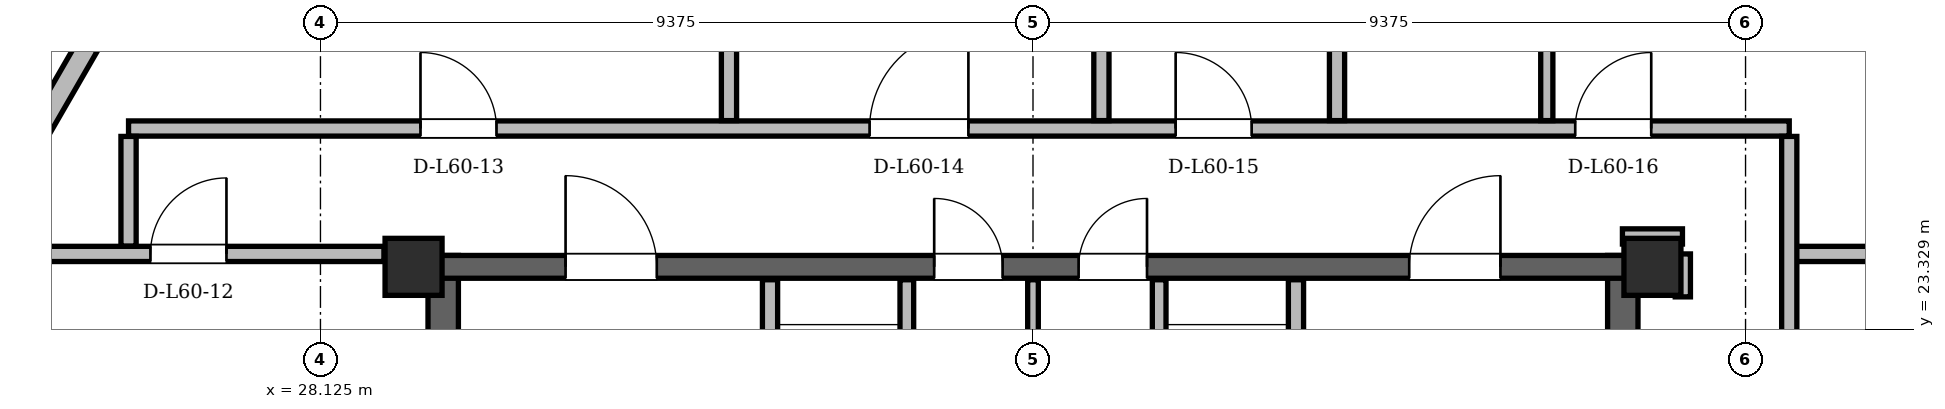
"""IFC4 building model, lengths in metres.
Left out: names, types, materials, properties, quantities, classifications, styles, units other than length and angle.
Written with IfcOpenShell. Run it as: python <this file> out.ifc"""

import sys

from ifc_helpers import new_model, si_unit, direction, frame, frame_2d, origin, origin_2d, place, context, subcontext, project, spatial, rectangle, hollow_rectangle, extrude, element, fill, save


model = new_model("IFC4")
c1 = context("Model", 3, precision=1e-05, world=origin(), true_north=direction((0.0, 1.0)))
c2 = subcontext(c1, "Body", "Model", "MODEL_VIEW")
j1 = project(units=[si_unit("LENGTHUNIT", "METRE"), si_unit("PLANEANGLEUNIT", "RADIAN")], contexts=[c1])
p1 = place(None, origin())
s1 = spatial("IfcSite", under=j1, at=p1, CompositionType="ELEMENT")
p2 = place(p1, origin())
s2 = spatial("IfcBuilding", under=s1, at=p2, CompositionType="ELEMENT")
p3 = place(p2, frame((0.0, 0.0, 227.1)))
s3 = spatial("IfcBuildingStorey", under=s2, at=p3, CompositionType="ELEMENT", Elevation=227.1)
for number, where, z_axis, x_axis in (
    (1, (45.65, 24.15, 0.0), (0.0, 0.0, 1.0), (1.0, 0.0, 0.0)),
    (2, (29.35, 24.15, 0.0), (0.0, 0.0, 1.0), (1.0, 0.0, 0.0)),
):
    element("IfcColumn", number, at=place(p3, frame(where, z_axis=z_axis, x_axis=x_axis)), inside=s3, PredefinedType="COLUMN", context=c2, shape_type="SweptSolid", body=[
        extrude(hollow_rectangle(XDim=0.75, YDim=0.75, WallThickness=0.06, at=origin_2d()), origin(), (0.0, 0.0, 1.0), 3.6),
    ])
for number, where, z_axis, x_axis in (
    (3, (29.74, 11.0, 0.0), (0.0, 0.0, 1.0), (0.0, 1.0, 0.0)),
    (4, (45.26, 11.0, 0.0), (0.0, 0.0, 1.0), (0.0, 1.0, 0.0)),
):
    element("IfcWall", number, at=place(p3, frame(where, z_axis=z_axis, x_axis=x_axis)), inside=s3, PredefinedType="SHEAR", context=c2, shape_type="SweptSolid", body=[
        extrude(rectangle(XDim=13.3, YDim=0.4, at=frame_2d((6.65, 0.0))), origin(), (0.0, 0.0, 1.0), 3.38),
    ])
p4 = place(p3, frame((29.65, 24.15, 0.0), z_axis=(0.0, 0.0, 1.0), x_axis=(1.0, 0.0, 0.0)))
e5 = element("IfcWall", 5, at=p4, inside=s3, PredefinedType="SHEAR", context=c2, shape_type="SweptSolid", body=[
    extrude(rectangle(XDim=15.7, YDim=0.3, at=frame_2d((7.85, 0.0))), origin(), (0.0, 0.0, 1.0), 3.38),
])
p5 = place(p4, frame((1.7, 0.0, 0.0)))
e6 = element("IfcOpeningElement", 6, at=p5, cuts=e5, PredefinedType="OPENING", context=c2, shape_type="SweptSolid", body=[
    extrude(rectangle(XDim=1.2, YDim=2.2, at=frame_2d((0.6, 1.1))), frame((0.0, 0.15, 0.0), z_axis=(0.0, -1.0, 0.0), x_axis=(1.0, 0.0, 0.0)), (0.0, 0.0, 1.0), 0.3),
])
p6 = place(p4, frame((12.8, 0.0, 0.0)))
e7 = element("IfcOpeningElement", 7, at=p6, cuts=e5, PredefinedType="OPENING", context=c2, shape_type="SweptSolid", body=[
    extrude(rectangle(XDim=1.2, YDim=2.2, at=frame_2d((0.6, 1.1))), frame((0.0, 0.15, 0.0), z_axis=(0.0, -1.0, 0.0), x_axis=(1.0, 0.0, 0.0)), (0.0, 0.0, 1.0), 0.3),
])
p7 = place(p4, frame((6.55, 0.0, 0.0)))
e8 = element("IfcOpeningElement", 8, at=p7, cuts=e5, PredefinedType="OPENING", context=c2, shape_type="SweptSolid", body=[
    extrude(rectangle(XDim=0.9, YDim=2.05, at=frame_2d((0.45, 1.025))), frame((0.0, 0.15, 0.0), z_axis=(0.0, -1.0, 0.0), x_axis=(1.0, 0.0, 0.0)), (0.0, 0.0, 1.0), 0.3),
])
p8 = place(p4, frame((8.45, 0.0, 0.0)))
e9 = element("IfcOpeningElement", 9, at=p8, cuts=e5, PredefinedType="OPENING", context=c2, shape_type="SweptSolid", body=[
    extrude(rectangle(XDim=0.9, YDim=2.05, at=frame_2d((0.45, 1.025))), frame((0.0, 0.15, 0.0), z_axis=(0.0, -1.0, 0.0), x_axis=(1.0, 0.0, 0.0)), (0.0, 0.0, 1.0), 0.3),
])
p9 = place(p3, frame((34.344, 43.135, 0.0), z_axis=(0.0, 0.0, 1.0), x_axis=(-0.499998927115, -0.866026023214, 0.0)))
e10 = element("IfcWall", 10, at=p9, inside=s3, PredefinedType="SOLIDWALL", context=c2, shape_type="SweptSolid", body=[
    extrude(rectangle(XDim=36.742, YDim=0.29, at=frame_2d((18.371, 0.0))), origin(), (0.0, 0.0, 1.0), 2.677),
])
p10 = place(p9, frame((8.664, 0.0, 0.0)))
e11 = element("IfcOpeningElement", 11, at=p10, cuts=e10, PredefinedType="OPENING", context=c2, shape_type="SweptSolid", body=[
    extrude(rectangle(XDim=1.5, YDim=2.2, at=frame_2d((0.75, 1.1))), frame((0.0, 0.145, 0.0), z_axis=(0.0, -1.0, 0.0), x_axis=(1.0, 0.0, 0.0)), (0.0, 0.0, 1.0), 0.29),
])
p11 = place(p9, frame((28.452, 0.0, 0.0)))
e12 = element("IfcOpeningElement", 12, at=p11, cuts=e10, PredefinedType="OPENING", context=c2, shape_type="SweptSolid", body=[
    extrude(rectangle(XDim=1.5, YDim=2.2, at=frame_2d((0.75, 1.1))), frame((0.0, 0.145, 0.0), z_axis=(0.0, -1.0, 0.0), x_axis=(1.0, 0.0, 0.0)), (0.0, 0.0, 1.0), 0.29),
])
p12 = place(p9, frame((22.282, 0.0, 0.85)))
e13 = element("IfcOpeningElement", 13, at=p12, cuts=e10, PredefinedType="OPENING", context=c2, shape_type="SweptSolid", body=[
    extrude(rectangle(XDim=2.4, YDim=1.717, at=frame_2d((1.2, 0.858))), frame((0.0, 0.145, 0.0), z_axis=(0.0, -1.0, 0.0), x_axis=(1.0, 0.0, 0.0)), (0.0, 0.0, 1.0), 0.29),
])
p13 = place(p9, frame((33.369, 0.0, 0.85)))
e14 = element("IfcOpeningElement", 14, at=p13, cuts=e10, PredefinedType="OPENING", context=c2, shape_type="SweptSolid", body=[
    extrude(rectangle(XDim=2.2, YDim=1.717, at=frame_2d((1.1, 0.858))), frame((0.0, 0.145, 0.0), z_axis=(0.0, -1.0, 0.0), x_axis=(1.0, 0.0, 0.0)), (0.0, 0.0, 1.0), 0.29),
])
p14 = place(p9, frame((11.999, 0.0, 0.85)))
e15 = element("IfcOpeningElement", 15, at=p14, cuts=e10, PredefinedType="OPENING", context=c2, shape_type="SweptSolid", body=[
    extrude(rectangle(XDim=2.4, YDim=1.717, at=frame_2d((1.2, 0.858))), frame((0.0, 0.145, 0.0), z_axis=(0.0, -1.0, 0.0), x_axis=(1.0, 0.0, 0.0)), (0.0, 0.0, 1.0), 0.29),
])
p15 = place(p9, frame((16.783, 0.0, 0.85)))
e16 = element("IfcOpeningElement", 16, at=p15, cuts=e10, PredefinedType="OPENING", context=c2, shape_type="SweptSolid", body=[
    extrude(rectangle(XDim=1.8, YDim=1.717, at=frame_2d((0.9, 0.858))), frame((0.0, 0.145, 0.0), z_axis=(0.0, -1.0, 0.0), x_axis=(1.0, 0.0, 0.0)), (0.0, 0.0, 1.0), 0.29),
])
p16 = place(p9, frame((3.365, 0.0, 0.85)))
e17 = element("IfcOpeningElement", 17, at=p16, cuts=e10, PredefinedType="OPENING", context=c2, shape_type="SweptSolid", body=[
    extrude(rectangle(XDim=1.2, YDim=1.48, at=frame_2d((0.6, 0.74))), frame((0.0, 0.145, 0.0), z_axis=(0.0, -1.0, 0.0), x_axis=(1.0, 0.0, 0.0)), (0.0, 0.0, 1.0), 0.29),
])
p17 = place(p9, frame((6.797, 0.0, 0.85)))
e18 = element("IfcOpeningElement", 18, at=p17, cuts=e10, PredefinedType="OPENING", context=c2, shape_type="SweptSolid", body=[
    extrude(rectangle(XDim=1.2, YDim=1.48, at=frame_2d((0.6, 0.74))), frame((0.0, 0.145, 0.0), z_axis=(0.0, -1.0, 0.0), x_axis=(1.0, 0.0, 0.0)), (0.0, 0.0, 1.0), 0.29),
])
p18 = place(p3, frame((34.04, 19.48, 0.0), z_axis=(0.0, 0.0, 1.0), x_axis=(0.0, 1.0, 0.0)))
e19 = element("IfcWall", 19, at=p18, inside=s3, PredefinedType="PARTITIONING", context=c2, shape_type="SweptSolid", body=[
    extrude(rectangle(XDim=4.5, YDim=0.2, at=frame_2d((2.25, 0.0))), origin(), (0.0, 0.0, 1.0), 3.38),
])
p19 = place(p18, frame((2.12, 0.0, 0.0)))
e20 = element("IfcOpeningElement", 20, at=p19, cuts=e19, PredefinedType="OPENING", context=c2, shape_type="SweptSolid", body=[
    extrude(rectangle(XDim=1.1, YDim=2.2, at=frame_2d((0.55, 1.1))), frame((0.0, 0.1, 0.0), z_axis=(0.0, -1.0, 0.0), x_axis=(1.0, 0.0, 0.0)), (0.0, 0.0, 1.0), 0.2),
])
p20 = place(p3, frame((35.84, 20.96, 0.0), z_axis=(0.0, 0.0, 1.0), x_axis=(0.0, 1.0, 0.0)))
e21 = element("IfcWall", 21, at=p20, inside=s3, PredefinedType="PARTITIONING", context=c2, shape_type="SweptSolid", body=[
    extrude(rectangle(XDim=3.02, YDim=0.18, at=frame_2d((1.51, 0.0))), origin(), (0.0, 0.0, 1.0), 3.38),
])
p21 = place(p3, frame((40.96, 19.48, 0.0), z_axis=(0.0, 0.0, 1.0), x_axis=(0.0, 1.0, 0.0)))
e22 = element("IfcWall", 22, at=p21, inside=s3, PredefinedType="PARTITIONING", context=c2, shape_type="SweptSolid", body=[
    extrude(rectangle(XDim=4.5, YDim=0.2, at=frame_2d((2.25, 0.0))), origin(), (0.0, 0.0, 1.0), 3.38),
])
p22 = place(p21, frame((2.12, 0.0, 0.0)))
e23 = element("IfcOpeningElement", 23, at=p22, cuts=e22, PredefinedType="OPENING", context=c2, shape_type="SweptSolid", body=[
    extrude(rectangle(XDim=1.1, YDim=2.2, at=frame_2d((0.55, 1.1))), frame((0.0, 0.1, 0.0), z_axis=(0.0, -1.0, 0.0), x_axis=(1.0, 0.0, 0.0)), (0.0, 0.0, 1.0), 0.2),
])
p23 = place(p3, frame((39.16, 20.96, 0.0), z_axis=(0.0, 0.0, 1.0), x_axis=(0.0, 1.0, 0.0)))
e24 = element("IfcWall", 24, at=p23, inside=s3, PredefinedType="PARTITIONING", context=c2, shape_type="SweptSolid", body=[
    extrude(rectangle(XDim=3.02, YDim=0.18, at=frame_2d((1.51, 0.0))), origin(), (0.0, 0.0, 1.0), 3.38),
])
p24 = place(p3, frame((37.5, 21.06, 0.0), z_axis=(0.0, 0.0, 1.0), x_axis=(0.0, 1.0, 0.0)))
e25 = element("IfcWall", 25, at=p24, inside=s3, PredefinedType="PARTITIONING", context=c2, shape_type="SweptSolid", body=[
    extrude(rectangle(XDim=2.92, YDim=0.14, at=frame_2d((1.46, 0.0))), origin(), (0.0, 0.0, 1.0), 3.38),
])
p25 = place(p3, frame((23.653, 24.32, 0.0), z_axis=(0.0, 0.0, 1.0), x_axis=(1.0, 0.0, 0.0)))
e26 = element("IfcWall", 26, at=p25, inside=s3, PredefinedType="PARTITIONING", context=c2, shape_type="SweptSolid", body=[
    extrude(rectangle(XDim=5.307, YDim=0.2, at=frame_2d((2.653, 0.0))), origin(), (0.0, 0.0, 1.0), 3.38),
])
p26 = place(p25, frame((2.235, 0.0, 0.0)))
e27 = element("IfcOpeningElement", 27, at=p26, cuts=e26, PredefinedType="OPENING", context=c2, shape_type="SweptSolid", body=[
    extrude(rectangle(XDim=1.0, YDim=2.18, at=frame_2d((0.5, 1.09))), frame((0.0, 0.1, 0.0), z_axis=(0.0, -1.0, 0.0), x_axis=(1.0, 0.0, 0.0)), (0.0, 0.0, 1.0), 0.2),
])
p27 = place(p3, frame((47.45, 24.32, 0.0), z_axis=(0.0, 0.0, 1.0), x_axis=(1.0, 0.0, 0.0)))
e28 = element("IfcWall", 28, at=p27, inside=s3, PredefinedType="PARTITIONING", context=c2, shape_type="SweptSolid", body=[
    extrude(rectangle(XDim=3.897, YDim=0.2, at=frame_2d((1.948, 0.0))), origin(), (0.0, 0.0, 1.0), 3.38),
])
p28 = place(p3, frame((45.255, 24.55, 0.0), z_axis=(0.0, 0.0, 1.0), x_axis=(1.0, 0.0, 0.0)))
e29 = element("IfcWall", 29, at=p28, inside=s3, PredefinedType="PARTITIONING", context=c2, shape_type="SweptSolid", body=[
    extrude(rectangle(XDim=0.79, YDim=0.2, at=frame_2d((0.395, 0.0))), origin(), (0.0, 0.0, 1.0), 2.913),
])
p29 = place(p3, frame((25.6, 25.97, 0.0), z_axis=(0.0, 0.0, 1.0), x_axis=(1.0, 0.0, 0.0)))
e30 = element("IfcWall", 30, at=p29, inside=s3, PredefinedType="PARTITIONING", context=c2, shape_type="SweptSolid", body=[
    extrude(rectangle(XDim=21.85, YDim=0.2, at=frame_2d((10.925, 0.0))), origin(), (0.0, 0.0, 1.0), 2.913),
])
p30 = place(p29, frame((3.841, 0.0, 0.0)))
e31 = element("IfcOpeningElement", 31, at=p30, cuts=e30, PredefinedType="OPENING", context=c2, shape_type="SweptSolid", body=[
    extrude(rectangle(XDim=1.0, YDim=2.18, at=frame_2d((0.5, 1.09))), frame((0.0, 0.1, 0.0), z_axis=(0.0, -1.0, 0.0), x_axis=(1.0, 0.0, 0.0)), (0.0, 0.0, 1.0), 0.2),
])
p31 = place(p29, frame((9.75, 0.0, 0.0)))
e32 = element("IfcOpeningElement", 32, at=p31, cuts=e30, PredefinedType="OPENING", context=c2, shape_type="SweptSolid", body=[
    extrude(rectangle(XDim=1.3, YDim=2.2, at=frame_2d((0.65, 1.1))), frame((0.0, 0.1, 0.0), z_axis=(0.0, -1.0, 0.0), x_axis=(1.0, 0.0, 0.0)), (0.0, 0.0, 1.0), 0.2),
])
p32 = place(p29, frame((13.777, 0.0, 0.0)))
e33 = element("IfcOpeningElement", 33, at=p32, cuts=e30, PredefinedType="OPENING", context=c2, shape_type="SweptSolid", body=[
    extrude(rectangle(XDim=1.0, YDim=2.18, at=frame_2d((0.5, 1.09))), frame((0.0, 0.1, 0.0), z_axis=(0.0, -1.0, 0.0), x_axis=(1.0, 0.0, 0.0)), (0.0, 0.0, 1.0), 0.2),
])
p33 = place(p29, frame((19.034, 0.0, 0.0)))
e34 = element("IfcOpeningElement", 34, at=p33, cuts=e30, PredefinedType="OPENING", context=c2, shape_type="SweptSolid", body=[
    extrude(rectangle(XDim=1.0, YDim=2.18, at=frame_2d((0.5, 1.09))), frame((0.0, 0.1, 0.0), z_axis=(0.0, -1.0, 0.0), x_axis=(1.0, 0.0, 0.0)), (0.0, 0.0, 1.0), 0.2),
])
p34 = place(p3, frame((25.6, 24.424, 0.0), z_axis=(0.0, 0.0, 1.0), x_axis=(0.0, 1.0, 0.0)))
e35 = element("IfcWall", 35, at=p34, inside=s3, PredefinedType="PARTITIONING", context=c2, shape_type="SweptSolid", body=[
    extrude(rectangle(XDim=1.442, YDim=0.2, at=frame_2d((0.721, 0.0))), origin(), (0.0, 0.0, 1.0), 3.38),
])
p35 = place(p3, frame((33.5, 26.074, 0.0), z_axis=(0.0, 0.0, 1.0), x_axis=(0.0, 1.0, 0.0)))
e36 = element("IfcWall", 36, at=p35, inside=s3, PredefinedType="PARTITIONING", context=c2, shape_type="SweptSolid", body=[
    extrude(rectangle(XDim=15.301, YDim=0.2, at=frame_2d((7.651, 0.0))), origin(), (0.0, 0.0, 1.0), 2.913),
])
p36 = place(p3, frame((38.4, 26.074, 0.0), z_axis=(0.0, 0.0, 1.0), x_axis=(0.0, 1.0, 0.0)))
e37 = element("IfcWall", 37, at=p36, inside=s3, PredefinedType="PARTITIONING", context=c2, shape_type="SweptSolid", body=[
    extrude(rectangle(XDim=4.292, YDim=0.2, at=frame_2d((2.146, 0.0))), origin(), (0.0, 0.0, 1.0), 3.38),
])
p37 = place(p3, frame((41.5, 26.074, 0.0), z_axis=(0.0, 0.0, 1.0), x_axis=(0.0, 1.0, 0.0)))
e38 = element("IfcWall", 38, at=p37, inside=s3, PredefinedType="PARTITIONING", context=c2, shape_type="SweptSolid", body=[
    extrude(rectangle(XDim=15.301, YDim=0.2, at=frame_2d((7.651, 0.0))), origin(), (0.0, 0.0, 1.0), 2.913),
])
p38 = place(p3, frame((44.26, 26.074, 0.0), z_axis=(0.0, 0.0, 1.0), x_axis=(0.0, 1.0, 0.0)))
e39 = element("IfcWall", 39, at=p38, inside=s3, PredefinedType="PARTITIONING", context=c2, shape_type="SweptSolid", body=[
    extrude(rectangle(XDim=10.521, YDim=0.16, at=frame_2d((5.26, 0.0))), origin(), (0.0, 0.0, 1.0), 2.913),
])
p39 = place(p38, frame((2.548, 0.0, 0.0)))
e40 = element("IfcOpeningElement", 40, at=p39, cuts=e39, PredefinedType="OPENING", context=c2, shape_type="SweptSolid", body=[
    extrude(rectangle(XDim=0.92, YDim=2.12, at=frame_2d((0.46, 1.06))), frame((0.0, 0.08, 0.0), z_axis=(0.0, -1.0, 0.0), x_axis=(1.0, 0.0, 0.0)), (0.0, 0.0, 1.0), 0.16),
])
p40 = place(p38, frame((6.917, 0.0, 0.0)))
e41 = element("IfcOpeningElement", 41, at=p40, cuts=e39, PredefinedType="OPENING", context=c2, shape_type="SweptSolid", body=[
    extrude(rectangle(XDim=0.95, YDim=2.1, at=frame_2d((0.475, 1.05))), frame((0.0, 0.08, 0.0), z_axis=(0.0, -1.0, 0.0), x_axis=(1.0, 0.0, 0.0)), (0.0, 0.0, 1.0), 0.16),
])
p41 = place(p38, frame((9.154, 0.0, 0.0)))
e42 = element("IfcOpeningElement", 42, at=p41, cuts=e39, PredefinedType="OPENING", context=c2, shape_type="SweptSolid", body=[
    extrude(rectangle(XDim=0.88, YDim=2.08, at=frame_2d((0.44, 1.04))), frame((0.0, 0.08, 0.0), z_axis=(0.0, -1.0, 0.0), x_axis=(1.0, 0.0, 0.0)), (0.0, 0.0, 1.0), 0.16),
])
p42 = place(p3, frame((46.05, 23.755, 0.0), z_axis=(0.0, 0.0, 1.0), x_axis=(0.0, 1.0, 0.0)))
e43 = element("IfcWall", 43, at=p42, inside=s3, PredefinedType="PARTITIONING", context=c2, shape_type="SweptSolid", body=[
    extrude(rectangle(XDim=0.565, YDim=0.2, at=frame_2d((0.283, 0.0))), origin(), (0.0, 0.0, 1.0), 3.38),
])
p43 = place(p3, frame((47.45, 9.404, 0.0), z_axis=(0.0, 0.0, 1.0), x_axis=(0.0, 1.0, 0.0)))
e44 = element("IfcWall", 44, at=p43, inside=s3, PredefinedType="PARTITIONING", context=c2, shape_type="SweptSolid", body=[
    extrude(rectangle(XDim=16.462, YDim=0.2, at=frame_2d((8.231, 0.0))), origin(), (0.0, 0.0, 1.0), 2.913),
])
p44 = place(p43, frame((3.163, 0.0, 0.0)))
e45 = element("IfcOpeningElement", 45, at=p44, cuts=e44, PredefinedType="OPENING", context=c2, shape_type="SweptSolid", body=[
    extrude(rectangle(XDim=1.0, YDim=2.18, at=frame_2d((0.5, 1.09))), frame((0.0, 0.1, 0.0), z_axis=(0.0, -1.0, 0.0), x_axis=(1.0, 0.0, 0.0)), (0.0, 0.0, 1.0), 0.2),
])
p45 = place(p43, frame((9.778, 0.0, 0.0)))
e46 = element("IfcOpeningElement", 46, at=p45, cuts=e44, PredefinedType="OPENING", context=c2, shape_type="SweptSolid", body=[
    extrude(rectangle(XDim=1.0, YDim=2.18, at=frame_2d((0.5, 1.09))), frame((0.0, 0.1, 0.0), z_axis=(0.0, -1.0, 0.0), x_axis=(1.0, 0.0, 0.0)), (0.0, 0.0, 1.0), 0.2),
])
p46 = place(p5, origin())
e47 = element("IfcDoor", 47, at=p46, inside=s3, OperationType="SINGLE_SWING_LEFT", PredefinedType="DOOR", context=c2, shape_type="SweptSolid", body=[
    extrude(rectangle(XDim=1.2, YDim=2.2, at=frame_2d((0.6, 1.1))), frame((0.0, 0.025, 0.0), z_axis=(0.0, -1.0, 0.0), x_axis=(1.0, 0.0, 0.0)), (0.0, 0.0, 1.0), 0.05),
])
fill(e6, e47)
p47 = place(p6, origin())
e48 = element("IfcDoor", 48, at=p47, inside=s3, OperationType="SINGLE_SWING_RIGHT", PredefinedType="DOOR", context=c2, shape_type="SweptSolid", body=[
    extrude(rectangle(XDim=1.2, YDim=2.2, at=frame_2d((0.6, 1.1))), frame((0.0, 0.025, 0.0), z_axis=(0.0, -1.0, 0.0), x_axis=(1.0, 0.0, 0.0)), (0.0, 0.0, 1.0), 0.05),
])
fill(e7, e48)
p48 = place(p7, origin())
e49 = element("IfcDoor", 49, at=p48, inside=s3, OperationType="SINGLE_SWING_LEFT", PredefinedType="DOOR", context=c2, shape_type="SweptSolid", body=[
    extrude(rectangle(XDim=0.9, YDim=2.05, at=frame_2d((0.45, 1.025))), frame((0.0, 0.025, 0.0), z_axis=(0.0, -1.0, 0.0), x_axis=(1.0, 0.0, 0.0)), (0.0, 0.0, 1.0), 0.05),
])
fill(e8, e49)
p49 = place(p8, origin())
e50 = element("IfcDoor", 50, at=p49, inside=s3, OperationType="SINGLE_SWING_RIGHT", PredefinedType="DOOR", context=c2, shape_type="SweptSolid", body=[
    extrude(rectangle(XDim=0.9, YDim=2.05, at=frame_2d((0.45, 1.025))), frame((0.0, 0.025, 0.0), z_axis=(0.0, -1.0, 0.0), x_axis=(1.0, 0.0, 0.0)), (0.0, 0.0, 1.0), 0.05),
])
fill(e9, e50)
p50 = place(p26, origin())
e51 = element("IfcDoor", 51, at=p50, inside=s3, OperationType="SINGLE_SWING_RIGHT", PredefinedType="DOOR", context=c2, shape_type="SweptSolid", body=[
    extrude(rectangle(XDim=1.0, YDim=2.18, at=frame_2d((0.5, 1.09))), frame((0.0, 0.025, 0.0), z_axis=(0.0, -1.0, 0.0), x_axis=(1.0, 0.0, 0.0)), (0.0, 0.0, 1.0), 0.05),
])
fill(e27, e51)
p51 = place(p30, origin())
e52 = element("IfcDoor", 52, at=p51, inside=s3, OperationType="SINGLE_SWING_LEFT", PredefinedType="DOOR", context=c2, shape_type="SweptSolid", body=[
    extrude(rectangle(XDim=1.0, YDim=2.18, at=frame_2d((0.5, 1.09))), frame((0.0, 0.025, 0.0), z_axis=(0.0, -1.0, 0.0), x_axis=(1.0, 0.0, 0.0)), (0.0, 0.0, 1.0), 0.05),
])
fill(e31, e52)
p52 = place(p31, origin())
e53 = element("IfcDoor", 53, at=p52, inside=s3, OperationType="SINGLE_SWING_RIGHT", PredefinedType="DOOR", context=c2, shape_type="SweptSolid", body=[
    extrude(rectangle(XDim=1.3, YDim=2.2, at=frame_2d((0.65, 1.1))), frame((0.0, 0.025, 0.0), z_axis=(0.0, -1.0, 0.0), x_axis=(1.0, 0.0, 0.0)), (0.0, 0.0, 1.0), 0.05),
])
fill(e32, e53)
p53 = place(p32, origin())
e54 = element("IfcDoor", 54, at=p53, inside=s3, OperationType="SINGLE_SWING_LEFT", PredefinedType="DOOR", context=c2, shape_type="SweptSolid", body=[
    extrude(rectangle(XDim=1.0, YDim=2.18, at=frame_2d((0.5, 1.09))), frame((0.0, 0.025, 0.0), z_axis=(0.0, -1.0, 0.0), x_axis=(1.0, 0.0, 0.0)), (0.0, 0.0, 1.0), 0.05),
])
fill(e33, e54)
p54 = place(p33, origin())
e55 = element("IfcDoor", 55, at=p54, inside=s3, OperationType="SINGLE_SWING_RIGHT", PredefinedType="DOOR", context=c2, shape_type="SweptSolid", body=[
    extrude(rectangle(XDim=1.0, YDim=2.18, at=frame_2d((0.5, 1.09))), frame((0.0, 0.025, 0.0), z_axis=(0.0, -1.0, 0.0), x_axis=(1.0, 0.0, 0.0)), (0.0, 0.0, 1.0), 0.05),
])
fill(e34, e55)
save(model, sys.argv[1])
